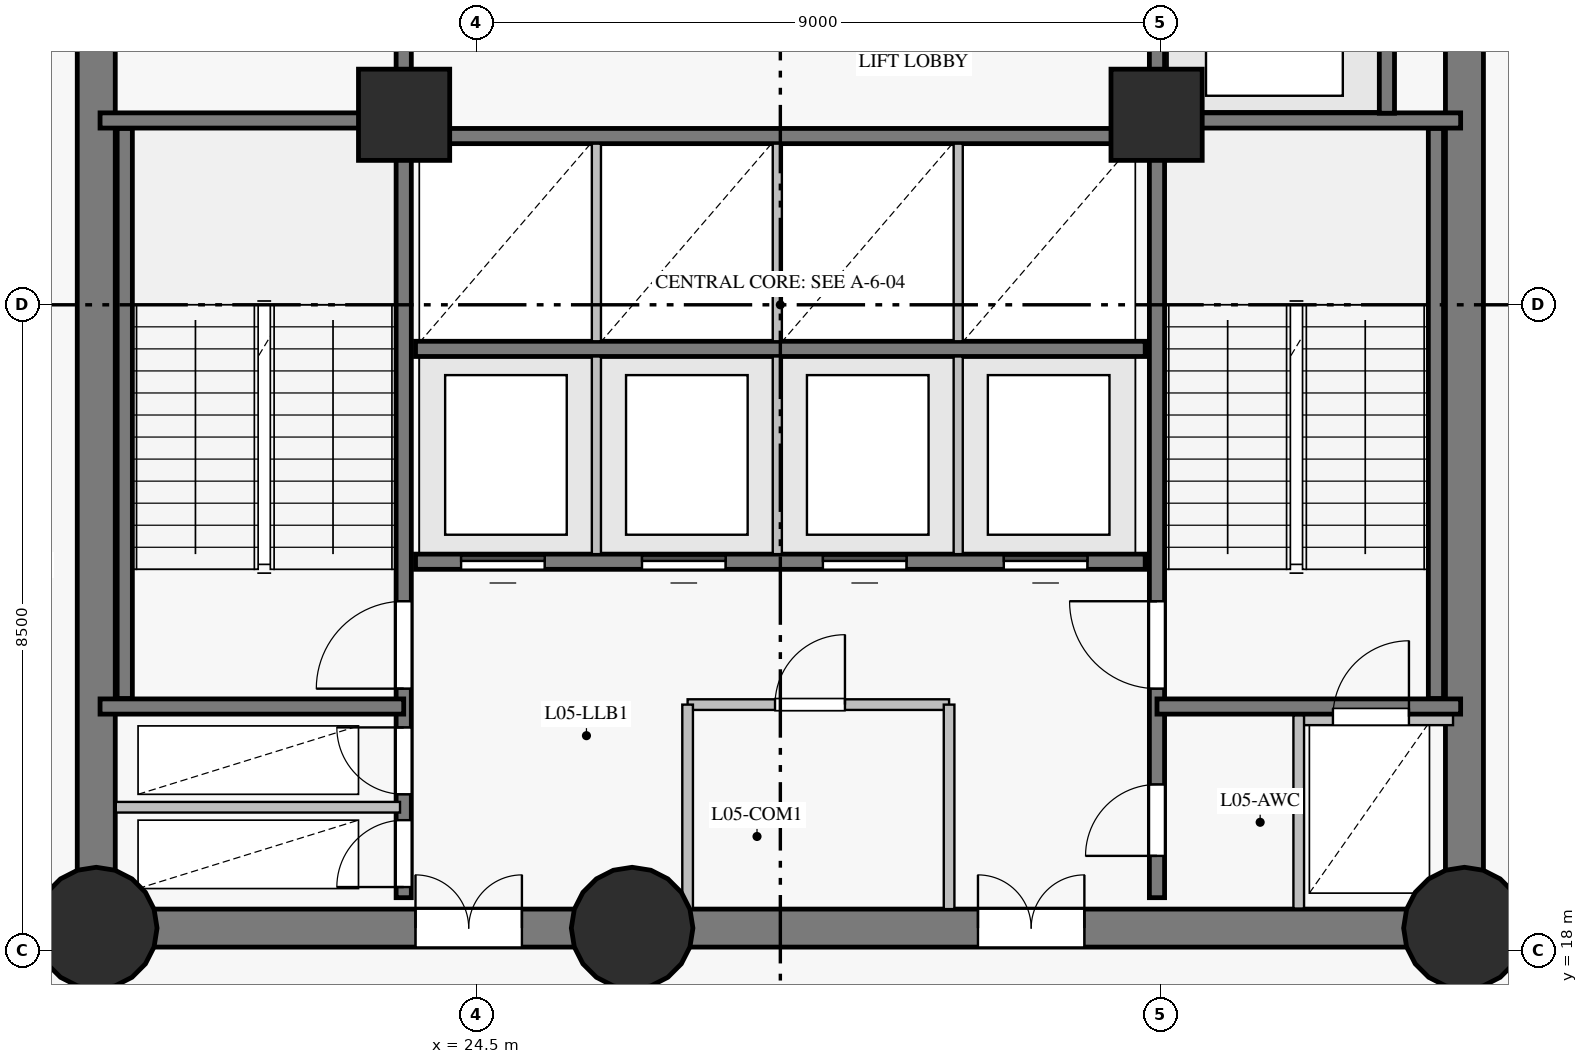
"""IFC4 building model, lengths in metres.
Left out: names, types, materials, properties, quantities, classifications, styles, units other than length and angle.
Written with IfcOpenShell. Run it as: python <this file> out.ifc"""

import sys

from ifc_helpers import new_model, si_unit, direction, frame, frame_2d, origin, origin_with_axes, origin_2d, place, context, subcontext, project, spatial, rectangle, circle, extrude, source, transform, mapped, element, fill, save


model = new_model("IFC4")
c1 = context("Model", 3, precision=1e-05, world=origin(), true_north=direction((0.0, 1.0)))
c2 = subcontext(c1, "Body", "Model", "MODEL_VIEW")
j1 = project(units=[si_unit("LENGTHUNIT", "METRE"), si_unit("PLANEANGLEUNIT", "RADIAN")], contexts=[c1])
p1 = place(None, origin())
s1 = spatial("IfcSite", under=j1, at=p1, CompositionType="ELEMENT")
p2 = place(p1, origin())
s2 = spatial("IfcBuilding", under=s1, at=p2, CompositionType="ELEMENT")
p3 = place(p2, frame((0.0, 0.0, 22.5)))
s3 = spatial("IfcBuildingStorey", under=s2, at=p3, CompositionType="ELEMENT", Elevation=22.5)
p4 = place(p3, frame((19.5, 18.3, 0.0), z_axis=(0.0, 0.0, 1.0), x_axis=(1.0, 0.0, 0.0)))
e1 = element("IfcWall", 1, at=p4, inside=s3, PredefinedType="SHEAR", context=c2, shape_type="SweptSolid", body=[
    extrude(rectangle(XDim=7.05, YDim=0.5, at=frame_2d((3.525, 0.0))), origin(), (0.0, 0.0, 1.0), 3.75),
])
p5 = place(p4, frame((4.2, 0.0, 0.0)))
e2 = element("IfcOpeningElement", 2, at=p5, cuts=e1, PredefinedType="OPENING", context=c2, shape_type="SweptSolid", body=[
    extrude(rectangle(XDim=1.4, YDim=2.2, at=frame_2d((0.7, 1.1))), frame((0.0, 0.26, 0.0), z_axis=(0.0, -1.0, 0.0), x_axis=(1.0, 0.0, 0.0)), (0.0, 0.0, 1.0), 0.52),
])
p6 = place(p3, frame((26.55, 18.3, 0.0), z_axis=(0.0, 0.0, 1.0), x_axis=(1.0, 0.0, 0.0)))
e3 = element("IfcWall", 3, at=p6, inside=s3, PredefinedType="SHEAR", context=c2, shape_type="SweptSolid", body=[
    extrude(rectangle(XDim=10.95, YDim=0.5, at=frame_2d((5.475, 0.0))), origin(), (0.0, 0.0, 1.0), 3.75),
])
p7 = place(p6, frame((4.55, 0.0, 0.0)))
e4 = element("IfcOpeningElement", 4, at=p7, cuts=e3, PredefinedType="OPENING", context=c2, shape_type="SweptSolid", body=[
    extrude(rectangle(XDim=1.4, YDim=2.2, at=frame_2d((0.7, 1.1))), frame((0.0, 0.26, 0.0), z_axis=(0.0, -1.0, 0.0), x_axis=(1.0, 0.0, 0.0)), (0.0, 0.0, 1.0), 0.52),
])
p8 = place(p3, frame((37.5, 18.3, 0.0), z_axis=(0.0, 0.0, 1.0), x_axis=(0.0, 1.0, 0.0)))
e5 = element("IfcWall", 5, at=p8, inside=s3, PredefinedType="SHEAR", context=c2, shape_type="SweptSolid", body=[
    extrude(rectangle(XDim=16.4, YDim=0.5, at=frame_2d((8.2, 0.0))), origin(), (0.0, 0.0, 1.0), 3.75),
])
p9 = place(p8, frame((14.06, 0.0, 0.0)))
e6 = element("IfcOpeningElement", 6, at=p9, cuts=e5, PredefinedType="OPENING", context=c2, shape_type="SweptSolid", body=[
    extrude(rectangle(XDim=1.2, YDim=2.15, at=frame_2d((0.6, 1.075))), frame((0.0, 0.26, 0.0), z_axis=(0.0, -1.0, 0.0), x_axis=(1.0, 0.0, 0.0)), (0.0, 0.0, 1.0), 0.52),
])
p10 = place(p3, frame((19.5, 34.7, 0.0), z_axis=(0.0, 0.0, 1.0), x_axis=(0.0, -1.0, 0.0)))
e7 = element("IfcWall", 7, at=p10, inside=s3, PredefinedType="SHEAR", context=c2, shape_type="SweptSolid", body=[
    extrude(rectangle(XDim=16.4, YDim=0.5, at=frame_2d((8.2, 0.0))), origin(), (0.0, 0.0, 1.0), 3.75),
])
p11 = place(p10, frame((3.1, 0.0, 0.0)))
e8 = element("IfcOpeningElement", 8, at=p11, cuts=e7, PredefinedType="OPENING", context=c2, shape_type="SweptSolid", body=[
    extrude(rectangle(XDim=1.1, YDim=2.15, at=frame_2d((0.55, 1.075))), frame((0.0, 0.26, 0.0), z_axis=(0.0, -1.0, 0.0), x_axis=(1.0, 0.0, 0.0)), (0.0, 0.0, 1.0), 0.52),
])
m1 = source(origin_with_axes(), c2, "Body", "SweptSolid", [
    extrude(circle(Radius=0.8, at=origin_2d()), origin(), (0.0, 0.0, 1.0), 4.0),
])
for number, where, z_axis, x_axis in (
    (9, (19.5, 18.3, 0.0), (0.0, 0.0, 1.0), (1.0, 0.0, 0.0)),
    (10, (26.55, 18.3, 0.0), (0.0, 0.0, 1.0), (1.0, 0.0, 0.0)),
    (11, (37.5, 18.3, 0.0), (0.0, 0.0, 1.0), (1.0, 0.0, 0.0)),
):
    element("IfcColumn", number, at=place(p3, frame(where, z_axis=z_axis, x_axis=x_axis)), inside=s3, PredefinedType="COLUMN", context=c2, shape_type="MappedRepresentation", body=[
        mapped(m1, transform((0.0, 0.0, 0.0), scale=1.0)),
    ])
m2 = source(origin_with_axes(), c2, "Body", "SweptSolid", [
    extrude(rectangle(XDim=1.2, YDim=1.2, at=origin_2d()), origin(), (0.0, 0.0, 1.0), 4.0),
])
for number, where, z_axis, x_axis in (
    (12, (23.55, 29.0, 0.0), (0.0, 0.0, 1.0), (1.0, 0.0, 0.0)),
    (13, (33.45, 29.0, 0.0), (0.0, 0.0, 1.0), (1.0, 0.0, 0.0)),
):
    element("IfcColumn", number, at=place(p3, frame(where, z_axis=z_axis, x_axis=x_axis)), inside=s3, PredefinedType="COLUMN", context=c2, shape_type="MappedRepresentation", body=[
        mapped(m2, transform((0.0, 0.0, 0.0), scale=1.0)),
    ])
p12 = place(p3, frame((35.32, 21.08, 0.0), z_axis=(0.0, 0.0, 1.0), x_axis=(1.0, 0.0, 0.0)))
e14 = element("IfcWall", 14, at=p12, inside=s3, PredefinedType="SHEAR", context=c2, shape_type="SweptSolid", body=[
    extrude(rectangle(XDim=2.03, YDim=0.22, at=frame_2d((1.015, 0.0))), origin(), (0.0, 0.0, 1.0), 2.45),
])
p13 = place(p12, frame((0.45, 0.0, 0.0)))
e15 = element("IfcOpeningElement", 15, at=p13, cuts=e14, PredefinedType="OPENING", context=c2, shape_type="SweptSolid", body=[
    extrude(rectangle(XDim=1.0, YDim=2.05, at=frame_2d((0.5, 1.025))), frame((0.0, 0.12, 0.0), z_axis=(0.0, -1.0, 0.0), x_axis=(1.0, 0.0, 0.0)), (0.0, 0.0, 1.0), 0.24),
])
p14 = place(p3, frame((23.545, 18.7, 0.0), z_axis=(0.0, 0.0, 1.0), x_axis=(0.0, 1.0, 0.0)))
e16 = element("IfcWall", 16, at=p14, inside=s3, PredefinedType="SHEAR", context=c2, shape_type="SweptSolid", body=[
    extrude(rectangle(XDim=15.6, YDim=0.2, at=frame_2d((7.8, 0.0))), origin(), (0.0, 0.0, 1.0), 3.75),
])
p15 = place(p14, frame((2.75, 0.0, 0.0)))
e17 = element("IfcOpeningElement", 17, at=p15, cuts=e16, PredefinedType="OPENING", context=c2, shape_type="SweptSolid", body=[
    extrude(rectangle(XDim=1.15, YDim=2.15, at=frame_2d((0.575, 1.075))), frame((0.0, 0.11, 0.0), z_axis=(0.0, -1.0, 0.0), x_axis=(1.0, 0.0, 0.0)), (0.0, 0.0, 1.0), 0.22),
])
p16 = place(p14, frame((0.14, 0.0, 0.0)))
e18 = element("IfcOpeningElement", 18, at=p16, cuts=e16, PredefinedType="OPENING", context=c2, shape_type="SweptSolid", body=[
    extrude(rectangle(XDim=0.88, YDim=2.1, at=frame_2d((0.44, 1.05))), frame((0.0, 0.11, 0.0), z_axis=(0.0, -1.0, 0.0), x_axis=(1.0, 0.0, 0.0)), (0.0, 0.0, 1.0), 0.22),
])
p17 = place(p14, frame((1.36, 0.0, 0.0)))
e19 = element("IfcOpeningElement", 19, at=p17, cuts=e16, PredefinedType="OPENING", context=c2, shape_type="SweptSolid", body=[
    extrude(rectangle(XDim=0.88, YDim=2.1, at=frame_2d((0.44, 1.05))), frame((0.0, 0.11, 0.0), z_axis=(0.0, -1.0, 0.0), x_axis=(1.0, 0.0, 0.0)), (0.0, 0.0, 1.0), 0.22),
])
p18 = place(p14, frame((12.1, 0.0, 0.0)))
e20 = element("IfcOpeningElement", 20, at=p18, cuts=e16, PredefinedType="OPENING", context=c2, shape_type="SweptSolid", body=[
    extrude(rectangle(XDim=1.12, YDim=2.15, at=frame_2d((0.56, 1.075))), frame((0.0, 0.11, 0.0), z_axis=(0.0, -1.0, 0.0), x_axis=(1.0, 0.0, 0.0)), (0.0, 0.0, 1.0), 0.22),
])
p19 = place(p14, frame((14.05, 0.0, 0.0)))
e21 = element("IfcOpeningElement", 21, at=p19, cuts=e16, PredefinedType="OPENING", context=c2, shape_type="SweptSolid", body=[
    extrude(rectangle(XDim=1.12, YDim=2.15, at=frame_2d((0.56, 1.075))), frame((0.0, 0.11, 0.0), z_axis=(0.0, -1.0, 0.0), x_axis=(1.0, 0.0, 0.0)), (0.0, 0.0, 1.0), 0.22),
])
p20 = place(p3, frame((33.455, 18.7, 0.0), z_axis=(0.0, 0.0, 1.0), x_axis=(0.0, 1.0, 0.0)))
e22 = element("IfcWall", 22, at=p20, inside=s3, PredefinedType="SHEAR", context=c2, shape_type="SweptSolid", body=[
    extrude(rectangle(XDim=15.6, YDim=0.2, at=frame_2d((7.8, 0.0))), origin(), (0.0, 0.0, 1.0), 3.75),
])
p21 = place(p20, frame((2.75, 0.0, 0.0)))
e23 = element("IfcOpeningElement", 23, at=p21, cuts=e22, PredefinedType="OPENING", context=c2, shape_type="SweptSolid", body=[
    extrude(rectangle(XDim=1.15, YDim=2.15, at=frame_2d((0.575, 1.075))), frame((0.0, 0.11, 0.0), z_axis=(0.0, -1.0, 0.0), x_axis=(1.0, 0.0, 0.0)), (0.0, 0.0, 1.0), 0.22),
])
p22 = place(p20, frame((0.55, 0.0, 0.0)))
e24 = element("IfcOpeningElement", 24, at=p22, cuts=e22, PredefinedType="OPENING", context=c2, shape_type="SweptSolid", body=[
    extrude(rectangle(XDim=0.94, YDim=2.1, at=frame_2d((0.47, 1.05))), frame((0.0, 0.11, 0.0), z_axis=(0.0, -1.0, 0.0), x_axis=(1.0, 0.0, 0.0)), (0.0, 0.0, 1.0), 0.22),
])
p23 = place(p3, frame((23.7, 23.12, 0.0), z_axis=(0.0, 0.0, 1.0), x_axis=(1.0, 0.0, 0.0)))
e25 = element("IfcWall", 25, at=p23, inside=s3, PredefinedType="SHEAR", context=c2, shape_type="SweptSolid", body=[
    extrude(rectangle(XDim=9.6, YDim=0.2, at=frame_2d((4.8, 0.0))), origin(), (0.0, 0.0, 1.0), 3.75),
])
p24 = place(p23, frame((0.6, 0.0, 0.0)))
e26 = element("IfcOpeningElement", 26, at=p24, cuts=e25, PredefinedType="OPENING", context=c2, shape_type="SweptSolid", body=[
    extrude(rectangle(XDim=1.1, YDim=2.15, at=frame_2d((0.55, 1.075))), frame((0.0, 0.11, 0.0), z_axis=(0.0, -1.0, 0.0), x_axis=(1.0, 0.0, 0.0)), (0.0, 0.0, 1.0), 0.22),
])
p25 = place(p23, frame((2.98, 0.0, 0.0)))
e27 = element("IfcOpeningElement", 27, at=p25, cuts=e25, PredefinedType="OPENING", context=c2, shape_type="SweptSolid", body=[
    extrude(rectangle(XDim=1.1, YDim=2.15, at=frame_2d((0.55, 1.075))), frame((0.0, 0.11, 0.0), z_axis=(0.0, -1.0, 0.0), x_axis=(1.0, 0.0, 0.0)), (0.0, 0.0, 1.0), 0.22),
])
p26 = place(p23, frame((5.36, 0.0, 0.0)))
e28 = element("IfcOpeningElement", 28, at=p26, cuts=e25, PredefinedType="OPENING", context=c2, shape_type="SweptSolid", body=[
    extrude(rectangle(XDim=1.1, YDim=2.15, at=frame_2d((0.55, 1.075))), frame((0.0, 0.11, 0.0), z_axis=(0.0, -1.0, 0.0), x_axis=(1.0, 0.0, 0.0)), (0.0, 0.0, 1.0), 0.22),
])
p27 = place(p23, frame((7.74, 0.0, 0.0)))
e29 = element("IfcOpeningElement", 29, at=p27, cuts=e25, PredefinedType="OPENING", context=c2, shape_type="SweptSolid", body=[
    extrude(rectangle(XDim=1.1, YDim=2.15, at=frame_2d((0.55, 1.075))), frame((0.0, 0.11, 0.0), z_axis=(0.0, -1.0, 0.0), x_axis=(1.0, 0.0, 0.0)), (0.0, 0.0, 1.0), 0.22),
])
for number, where, z_axis, x_axis in (
    (30, (23.7, 25.92, 0.0), (0.0, 0.0, 1.0), (1.0, 0.0, 0.0)),
    (31, (23.7, 28.72, 0.0), (0.0, 0.0, 1.0), (1.0, 0.0, 0.0)),
):
    element("IfcWall", number, at=place(p3, frame(where, z_axis=z_axis, x_axis=x_axis)), inside=s3, PredefinedType="SHEAR", context=c2, shape_type="SweptSolid", body=[
        extrude(rectangle(XDim=9.6, YDim=0.2, at=frame_2d((4.8, 0.0))), origin(), (0.0, 0.0, 1.0), 3.75),
    ])
for number, where, z_axis, x_axis in (
    (32, (19.875, 21.32, 0.0), (0.0, 0.0, 1.0), (0.0, 1.0, 0.0)),
    (33, (37.125, 21.32, 0.0), (0.0, 0.0, 1.0), (0.0, 1.0, 0.0)),
):
    element("IfcWall", number, at=place(p3, frame(where, z_axis=z_axis, x_axis=x_axis)), inside=s3, PredefinedType="SHEAR", context=c2, shape_type="SweptSolid", body=[
        extrude(rectangle(XDim=7.5, YDim=0.2, at=frame_2d((3.75, 0.0))), origin(), (0.0, 0.0, 1.0), 3.75),
    ])
for number, where, z_axis, x_axis in (
    (34, (33.455, 21.215, 0.0), (0.0, 0.0, 1.0), (1.0, 0.0, 0.0)),
    (35, (33.455, 28.925, 0.0), (0.0, 0.0, 1.0), (1.0, 0.0, 0.0)),
    (36, (19.55, 21.215, 0.0), (0.0, 0.0, 1.0), (1.0, 0.0, 0.0)),
    (37, (19.55, 28.925, 0.0), (0.0, 0.0, 1.0), (1.0, 0.0, 0.0)),
):
    element("IfcWall", number, at=place(p3, frame(where, z_axis=z_axis, x_axis=x_axis)), inside=s3, PredefinedType="SHEAR", context=c2, shape_type="SweptSolid", body=[
        extrude(rectangle(XDim=3.995, YDim=0.2, at=frame_2d((1.998, 0.0))), origin(), (0.0, 0.0, 1.0), 3.75),
    ])
p28 = place(p3, frame((36.48, 29.02, 0.0), z_axis=(0.0, 0.0, 1.0), x_axis=(0.0, 1.0, 0.0)))
e38 = element("IfcWall", 38, at=p28, inside=s3, PredefinedType="SHEAR", context=c2, shape_type="SweptSolid", body=[
    extrude(rectangle(XDim=2.86, YDim=0.2, at=frame_2d((1.43, 0.0))), origin(), (0.0, 0.0, 1.0), 3.75),
])
p29 = place(p3, frame((19.757, 19.89, 0.0), z_axis=(0.0, 0.0, 1.0), x_axis=(1.0, 0.0, 0.0)))
e39 = element("IfcWall", 39, at=p29, inside=s3, PredefinedType="PARTITIONING", context=c2, shape_type="SweptSolid", body=[
    extrude(rectangle(XDim=3.739, YDim=0.14, at=frame_2d((1.87, 0.0))), origin(), (0.0, 0.0, 1.0), 3.75),
])
p30 = place(p3, frame((27.28, 21.24, 0.0), z_axis=(0.0, 0.0, 1.0), x_axis=(1.0, 0.0, 0.0)))
e40 = element("IfcWall", 40, at=p30, inside=s3, PredefinedType="PARTITIONING", context=c2, shape_type="SweptSolid", body=[
    extrude(rectangle(XDim=3.44, YDim=0.14, at=frame_2d((1.72, 0.0))), origin(), (0.0, 0.0, 1.0), 3.75),
])
p31 = place(p30, frame((1.15, 0.0, 0.0)))
e41 = element("IfcOpeningElement", 41, at=p31, cuts=e40, PredefinedType="OPENING", context=c2, shape_type="SweptSolid", body=[
    extrude(rectangle(XDim=0.92, YDim=2.1, at=frame_2d((0.46, 1.05))), frame((0.0, 0.08, 0.0), z_axis=(0.0, -1.0, 0.0), x_axis=(1.0, 0.0, 0.0)), (0.0, 0.0, 1.0), 0.16),
])
for number, where, z_axis, x_axis in (
    (42, (27.28, 18.55, 0.0), (0.0, 0.0, 1.0), (0.0, 1.0, 0.0)),
    (43, (30.72, 18.55, 0.0), (0.0, 0.0, 1.0), (0.0, 1.0, 0.0)),
):
    element("IfcWall", number, at=place(p3, frame(where, z_axis=z_axis, x_axis=x_axis)), inside=s3, PredefinedType="PARTITIONING", context=c2, shape_type="SweptSolid", body=[
        extrude(rectangle(XDim=2.69, YDim=0.14, at=frame_2d((1.345, 0.0))), origin(), (0.0, 0.0, 1.0), 3.75),
    ])
for number, where, z_axis, x_axis in (
    (44, (26.08, 23.22, 0.0), (0.0, 0.0, 1.0), (0.0, 1.0, 0.0)),
    (45, (28.46, 23.22, 0.0), (0.0, 0.0, 1.0), (0.0, 1.0, 0.0)),
    (46, (30.84, 23.22, 0.0), (0.0, 0.0, 1.0), (0.0, 1.0, 0.0)),
    (47, (26.08, 26.02, 0.0), (0.0, 0.0, 1.0), (0.0, 1.0, 0.0)),
    (48, (28.46, 26.02, 0.0), (0.0, 0.0, 1.0), (0.0, 1.0, 0.0)),
    (49, (30.84, 26.02, 0.0), (0.0, 0.0, 1.0), (0.0, 1.0, 0.0)),
):
    element("IfcWall", number, at=place(p3, frame(where, z_axis=z_axis, x_axis=x_axis)), inside=s3, PredefinedType="PARTITIONING", context=c2, shape_type="SweptSolid", body=[
        extrude(rectangle(XDim=2.6, YDim=0.12, at=frame_2d((1.3, 0.0))), origin(), (0.0, 0.0, 1.0), 3.75),
    ])
p32 = place(p3, frame((35.32, 18.557, 0.0), z_axis=(0.0, 0.0, 1.0), x_axis=(0.0, 1.0, 0.0)))
e50 = element("IfcWall", 50, at=p32, inside=s3, PredefinedType="PARTITIONING", context=c2, shape_type="SweptSolid", body=[
    extrude(rectangle(XDim=2.541, YDim=0.14, at=frame_2d((1.271, 0.0))), origin(), (0.0, 0.0, 1.0), 3.75),
])
m3 = source(origin_with_axes(), c2, "Body", "SweptSolid", [
    extrude(rectangle(XDim=1.0, YDim=2.05, at=frame_2d((0.5, 1.025))), frame((0.0, 0.025, 0.0), z_axis=(0.0, -1.0, 0.0), x_axis=(1.0, 0.0, 0.0)), (0.0, 0.0, 1.0), 0.05),
])
p33 = place(p13, origin())
e51 = element("IfcDoor", 51, at=p33, inside=s3, OperationType="SINGLE_SWING_RIGHT", PredefinedType="TRAPDOOR", context=c2, shape_type="MappedRepresentation", body=[
    mapped(m3, transform((0.0, 0.0, 0.0), scale=1.0)),
])
fill(e15, e51)
m4 = source(origin_with_axes(), c2, "Body", "SweptSolid", [
    extrude(rectangle(XDim=1.15, YDim=2.15, at=frame_2d((0.575, 1.075))), frame((0.0, 0.025, 0.0), z_axis=(0.0, -1.0, 0.0), x_axis=(1.0, 0.0, 0.0)), (0.0, 0.0, 1.0), 0.05),
])
p34 = place(p15, origin())
e52 = element("IfcDoor", 52, at=p34, inside=s3, OperationType="SINGLE_SWING_LEFT", PredefinedType="DOOR", context=c2, shape_type="MappedRepresentation", body=[
    mapped(m4, transform((0.0, 0.0, 0.0), scale=1.0)),
])
fill(e17, e52)
p35 = place(p21, origin())
e53 = element("IfcDoor", 53, at=p35, inside=s3, OperationType="SINGLE_SWING_RIGHT", PredefinedType="DOOR", context=c2, shape_type="MappedRepresentation", body=[
    mapped(m4, transform((0.0, 0.0, 0.0), scale=1.0)),
])
fill(e23, e53)
m5 = source(origin_with_axes(), c2, "Body", "SweptSolid", [
    extrude(rectangle(XDim=0.88, YDim=2.1, at=frame_2d((0.44, 1.05))), frame((0.0, 0.025, 0.0), z_axis=(0.0, -1.0, 0.0), x_axis=(1.0, 0.0, 0.0)), (0.0, 0.0, 1.0), 0.05),
])
p36 = place(p16, origin())
e54 = element("IfcDoor", 54, at=p36, inside=s3, OperationType="SINGLE_SWING_LEFT", PredefinedType="DOOR", context=c2, shape_type="MappedRepresentation", body=[
    mapped(m5, transform((0.0, 0.0, 0.0), scale=1.0)),
])
fill(e18, e54)
p37 = place(p17, origin())
e55 = element("IfcDoor", 55, at=p37, inside=s3, OperationType="SINGLE_SWING_RIGHT", PredefinedType="DOOR", context=c2, shape_type="MappedRepresentation", body=[
    mapped(m5, transform((0.0, 0.0, 0.0), scale=1.0)),
])
fill(e19, e55)
m6 = source(origin_with_axes(), c2, "Body", "SweptSolid", [
    extrude(rectangle(XDim=1.4, YDim=2.2, at=frame_2d((0.7, 1.1))), frame((0.0, 0.025, 0.0), z_axis=(0.0, -1.0, 0.0), x_axis=(1.0, 0.0, 0.0)), (0.0, 0.0, 1.0), 0.05),
])
p38 = place(p5, origin())
e56 = element("IfcDoor", 56, at=p38, inside=s3, OperationType="DOUBLE_DOOR_SINGLE_SWING", PredefinedType="DOOR", context=c2, shape_type="MappedRepresentation", body=[
    mapped(m6, transform((0.0, 0.0, 0.0), scale=1.0)),
])
fill(e2, e56)
p39 = place(p7, origin())
e57 = element("IfcDoor", 57, at=p39, inside=s3, OperationType="DOUBLE_DOOR_SINGLE_SWING", PredefinedType="DOOR", context=c2, shape_type="MappedRepresentation", body=[
    mapped(m6, transform((0.0, 0.0, 0.0), scale=1.0)),
])
fill(e4, e57)
m7 = source(origin_with_axes(), c2, "Body", "SweptSolid", [
    extrude(rectangle(XDim=0.94, YDim=2.1, at=frame_2d((0.47, 1.05))), frame((0.0, 0.025, 0.0), z_axis=(0.0, -1.0, 0.0), x_axis=(1.0, 0.0, 0.0)), (0.0, 0.0, 1.0), 0.05),
])
p40 = place(p22, origin())
e58 = element("IfcDoor", 58, at=p40, inside=s3, OperationType="SINGLE_SWING_LEFT", PredefinedType="DOOR", context=c2, shape_type="MappedRepresentation", body=[
    mapped(m7, transform((0.0, 0.0, 0.0), scale=1.0)),
])
fill(e24, e58)
m8 = source(origin_with_axes(), c2, "Body", "SweptSolid", [
    extrude(rectangle(XDim=0.92, YDim=2.1, at=frame_2d((0.46, 1.05))), frame((0.0, 0.025, 0.0), z_axis=(0.0, -1.0, 0.0), x_axis=(1.0, 0.0, 0.0)), (0.0, 0.0, 1.0), 0.05),
])
p41 = place(p31, origin())
e59 = element("IfcDoor", 59, at=p41, inside=s3, OperationType="SINGLE_SWING_RIGHT", PredefinedType="DOOR", context=c2, shape_type="MappedRepresentation", body=[
    mapped(m8, transform((0.0, 0.0, 0.0), scale=1.0)),
])
fill(e41, e59)
m9 = source(origin_with_axes(), c2, "Body", "SweptSolid", [
    extrude(rectangle(XDim=1.1, YDim=2.15, at=frame_2d((0.55, 1.075))), frame((0.0, 0.025, 0.0), z_axis=(0.0, -1.0, 0.0), x_axis=(1.0, 0.0, 0.0)), (0.0, 0.0, 1.0), 0.05),
])
p42 = place(p24, origin())
e60 = element("IfcDoor", 60, at=p42, inside=s3, OperationType="SLIDING_TO_LEFT", PredefinedType="DOOR", context=c2, shape_type="MappedRepresentation", body=[
    mapped(m9, transform((0.0, 0.0, 0.0), scale=1.0)),
])
fill(e26, e60)
p43 = place(p25, origin())
e61 = element("IfcDoor", 61, at=p43, inside=s3, OperationType="SLIDING_TO_RIGHT", PredefinedType="DOOR", context=c2, shape_type="MappedRepresentation", body=[
    mapped(m9, transform((0.0, 0.0, 0.0), scale=1.0)),
])
fill(e27, e61)
p44 = place(p26, origin())
e62 = element("IfcDoor", 62, at=p44, inside=s3, OperationType="SLIDING_TO_LEFT", PredefinedType="DOOR", context=c2, shape_type="MappedRepresentation", body=[
    mapped(m9, transform((0.0, 0.0, 0.0), scale=1.0)),
])
fill(e28, e62)
p45 = place(p27, origin())
e63 = element("IfcDoor", 63, at=p45, inside=s3, OperationType="SLIDING_TO_RIGHT", PredefinedType="DOOR", context=c2, shape_type="MappedRepresentation", body=[
    mapped(m9, transform((0.0, 0.0, 0.0), scale=1.0)),
])
fill(e29, e63)
save(model, sys.argv[1])
